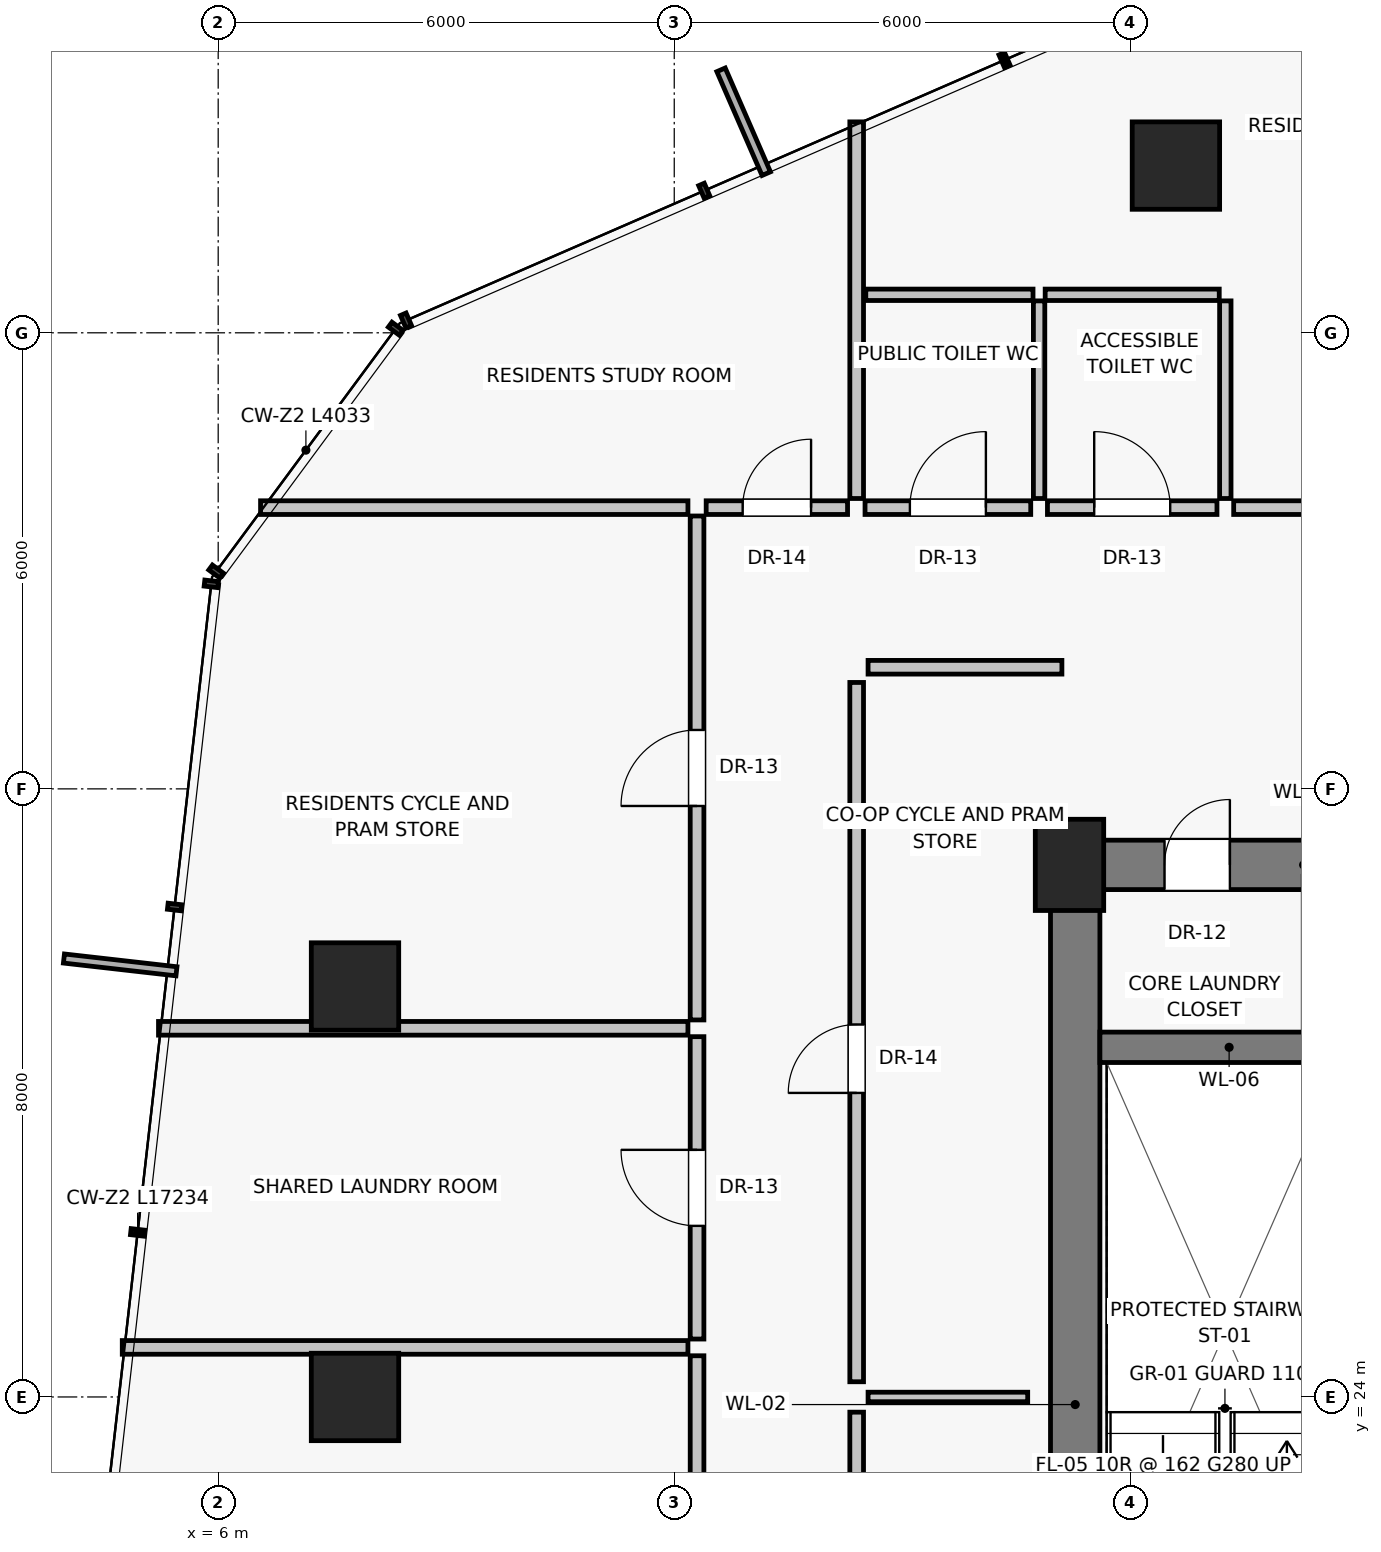
"""IFC4 building model, lengths in metres.
Left out: names, types, materials, properties, quantities, classifications, styles, units other than length and angle.
Written with IfcOpenShell. Run it as: python <this file> out.ifc"""

import sys

from ifc_helpers import new_model, si_unit, direction, frame, frame_2d, origin, origin_2d, place, context, subcontext, project, spatial, rectangle, extrude, source, transform, mapped, element, fill, save


model = new_model("IFC4")
c1 = context("Model", 3, precision=1e-05, world=origin(), true_north=direction((0.0, 1.0)))
c2 = subcontext(c1, "Body", "Model", "MODEL_VIEW")
j1 = project(units=[si_unit("LENGTHUNIT", "METRE"), si_unit("PLANEANGLEUNIT", "RADIAN")], contexts=[c1])
p1 = place(None, origin())
s1 = spatial("IfcSite", under=j1, at=p1, CompositionType="ELEMENT")
p2 = place(p1, origin())
s2 = spatial("IfcBuilding", under=s1, at=p2, CompositionType="ELEMENT")
p3 = place(p2, frame((0.0, 0.0, 105.7)))
s3 = spatial("IfcBuildingStorey", under=s2, at=p3, CompositionType="ELEMENT", Elevation=105.7)
p4 = place(p3, frame((17.2, 31.0, 0.0), z_axis=(0.0, 0.0, 1.0), x_axis=(1.0, 0.0, 0.0)))
e1 = element("IfcColumn", 1, at=p4, inside=s3, PredefinedType="PILASTER", context=c2, shape_type="SweptSolid", body=[
    extrude(rectangle(XDim=0.9, YDim=1.2, at=origin_2d()), origin(), (0.0, 0.0, 1.0), 3.25),
])
for number, where, z_axis, x_axis in (
    (2, (18.6, 40.2, 0.0), (0.0, 0.0, 1.0), (1.0, 0.0, 0.0)),
    (3, (7.8, 29.4, 0.0), (0.0, 0.0, 1.0), (1.0, 0.0, 0.0)),
    (4, (7.8, 24.0, 0.0), (0.0, 0.0, 1.0), (1.0, 0.0, 0.0)),
):
    element("IfcColumn", number, at=place(p3, frame(where, z_axis=z_axis, x_axis=x_axis)), inside=s3, PredefinedType="COLUMN", context=c2, shape_type="SweptSolid", body=[
        extrude(rectangle(XDim=1.15, YDim=1.15, at=origin_2d()), origin(), (0.0, 0.0, 1.0), 3.25),
    ])
p5 = place(p3, frame((17.275, 16.8, 0.0), z_axis=(0.0, 0.0, 1.0), x_axis=(0.0, 1.0, 0.0)))
e5 = element("IfcWall", 5, at=p5, inside=s3, PredefinedType="SHEAR", context=c2, shape_type="SweptSolid", body=[
    extrude(rectangle(XDim=14.2, YDim=0.65, at=frame_2d((7.1, 0.0))), origin(), (0.0, 0.0, 1.0), 2.97),
])
p6 = place(p3, frame((17.2, 31.0, 0.0), z_axis=(0.0, 0.0, 1.0), x_axis=(1.0, 0.0, 0.0)))
e6 = element("IfcWall", 6, at=p6, inside=s3, PredefinedType="SHEAR", context=c2, shape_type="SweptSolid", body=[
    extrude(rectangle(XDim=3.8, YDim=0.65, at=frame_2d((1.9, 0.0))), origin(), (0.0, 0.0, 1.0), 2.97),
])
p7 = place(p6, frame((1.25, 0.0, 0.0)))
e7 = element("IfcOpeningElement", 7, at=p7, cuts=e6, PredefinedType="OPENING", context=c2, shape_type="SweptSolid", body=[
    extrude(rectangle(XDim=0.86, YDim=2.01, at=frame_2d((0.43, 1.005))), frame((0.0, 0.335, 0.0), z_axis=(0.0, -1.0, 0.0), x_axis=(1.0, 0.0, 0.0)), (0.0, 0.0, 1.0), 0.67),
])
p8 = place(p3, frame((17.6, 28.6, 0.0), z_axis=(0.0, 0.0, 1.0), x_axis=(1.0, 0.0, 0.0)))
e8 = element("IfcWall", 8, at=p8, inside=s3, PredefinedType="SHEAR", context=c2, shape_type="SweptSolid", body=[
    extrude(rectangle(XDim=3.4, YDim=0.4, at=frame_2d((1.7, 0.0))), origin(), (0.0, 0.0, 1.0), 2.97),
])
p9 = place(p3, frame((14.4, 14.4, 0.0), z_axis=(0.0, 0.0, 1.0), x_axis=(0.0, 1.0, 0.0)))
e9 = element("IfcWall", 9, at=p9, inside=s3, PredefinedType="PARTITIONING", context=c2, shape_type="SweptSolid", body=[
    extrude(rectangle(XDim=9.4, YDim=0.18, at=frame_2d((4.7, 0.0))), origin(), (0.0, 0.0, 1.0), 2.97),
])
p10 = place(p9, frame((3.8, 0.0, 0.0)))
e10 = element("IfcOpeningElement", 10, at=p10, cuts=e9, PredefinedType="OPENING", context=c2, shape_type="SweptSolid", body=[
    extrude(rectangle(XDim=0.9, YDim=2.01, at=frame_2d((0.45, 1.005))), frame((0.0, 0.1, 0.0), z_axis=(0.0, -1.0, 0.0), x_axis=(1.0, 0.0, 0.0)), (0.0, 0.0, 1.0), 0.2),
])
p11 = place(p3, frame((14.4, 24.2, 0.0), z_axis=(0.0, 0.0, 1.0), x_axis=(0.0, 1.0, 0.0)))
e11 = element("IfcWall", 11, at=p11, inside=s3, PredefinedType="PARTITIONING", context=c2, shape_type="SweptSolid", body=[
    extrude(rectangle(XDim=9.2, YDim=0.18, at=frame_2d((4.6, 0.0))), origin(), (0.0, 0.0, 1.0), 2.97),
])
p12 = place(p11, frame((3.8, 0.0, 0.0)))
e12 = element("IfcOpeningElement", 12, at=p12, cuts=e11, PredefinedType="OPENING", context=c2, shape_type="SweptSolid", body=[
    extrude(rectangle(XDim=0.9, YDim=2.01, at=frame_2d((0.45, 1.005))), frame((0.0, 0.1, 0.0), z_axis=(0.0, -1.0, 0.0), x_axis=(1.0, 0.0, 0.0)), (0.0, 0.0, 1.0), 0.2),
])
p13 = place(p3, frame((14.55, 24.0, 0.0), z_axis=(0.0, 0.0, 1.0), x_axis=(1.0, 0.0, 0.0)))
e13 = element("IfcWall", 13, at=p13, inside=s3, PredefinedType="PARTITIONING", context=c2, shape_type="SweptSolid", body=[
    extrude(rectangle(XDim=2.1, YDim=0.125, at=frame_2d((1.05, 0.0))), origin(), (0.0, 0.0, 1.0), 2.97),
])
p14 = place(p3, frame((14.55, 33.6, 0.0), z_axis=(0.0, 0.0, 1.0), x_axis=(1.0, 0.0, 0.0)))
e14 = element("IfcWall", 14, at=p14, inside=s3, PredefinedType="PARTITIONING", context=c2, shape_type="SweptSolid", body=[
    extrude(rectangle(XDim=2.55, YDim=0.18, at=frame_2d((1.275, 0.0))), origin(), (0.0, 0.0, 1.0), 2.97),
])
p15 = place(p3, frame((14.4, 35.82, 0.0), z_axis=(0.0, 0.0, 1.0), x_axis=(0.0, 1.0, 0.0)))
e15 = element("IfcWall", 15, at=p15, inside=s3, PredefinedType="PARTITIONING", context=c2, shape_type="SweptSolid", body=[
    extrude(rectangle(XDim=4.955, YDim=0.18, at=frame_2d((2.478, 0.0))), origin(), (0.0, 0.0, 1.0), 2.97),
])
p16 = place(p3, frame((14.51, 35.7, 0.0), z_axis=(0.0, 0.0, 1.0), x_axis=(1.0, 0.0, 0.0)))
e16 = element("IfcWall", 16, at=p16, inside=s3, PredefinedType="PARTITIONING", context=c2, shape_type="SweptSolid", body=[
    extrude(rectangle(XDim=2.18, YDim=0.18, at=frame_2d((1.09, 0.0))), origin(), (0.0, 0.0, 1.0), 2.97),
])
p17 = place(p16, frame((0.59, 0.0, 0.0)))
e17 = element("IfcOpeningElement", 17, at=p17, cuts=e16, PredefinedType="OPENING", context=c2, shape_type="SweptSolid", body=[
    extrude(rectangle(XDim=1.0, YDim=2.01, at=frame_2d((0.5, 1.005))), frame((0.0, 0.1, 0.0), z_axis=(0.0, -1.0, 0.0), x_axis=(1.0, 0.0, 0.0)), (0.0, 0.0, 1.0), 0.2),
])
p18 = place(p3, frame((16.91, 35.7, 0.0), z_axis=(0.0, 0.0, 1.0), x_axis=(1.0, 0.0, 0.0)))
e18 = element("IfcWall", 18, at=p18, inside=s3, PredefinedType="PARTITIONING", context=c2, shape_type="SweptSolid", body=[
    extrude(rectangle(XDim=2.23, YDim=0.18, at=frame_2d((1.115, 0.0))), origin(), (0.0, 0.0, 1.0), 2.55),
])
p19 = place(p18, frame((0.615, 0.0, 0.0)))
e19 = element("IfcOpeningElement", 19, at=p19, cuts=e18, PredefinedType="OPENING", context=c2, shape_type="SweptSolid", body=[
    extrude(rectangle(XDim=1.0, YDim=2.01, at=frame_2d((0.5, 1.005))), frame((0.0, 0.1, 0.0), z_axis=(0.0, -1.0, 0.0), x_axis=(1.0, 0.0, 0.0)), (0.0, 0.0, 1.0), 0.2),
])
p20 = place(p3, frame((19.36, 35.7, 0.0), z_axis=(0.0, 0.0, 1.0), x_axis=(1.0, 0.0, 0.0)))
e20 = element("IfcWall", 20, at=p20, inside=s3, PredefinedType="PARTITIONING", context=c2, shape_type="SweptSolid", body=[
    extrude(rectangle(XDim=4.53, YDim=0.18, at=frame_2d((2.265, 0.0))), origin(), (0.0, 0.0, 1.0), 2.55),
])
p21 = place(p20, frame((1.765, 0.0, 0.0)))
e21 = element("IfcOpeningElement", 21, at=p21, cuts=e20, PredefinedType="OPENING", context=c2, shape_type="SweptSolid", body=[
    extrude(rectangle(XDim=1.0, YDim=2.01, at=frame_2d((0.5, 1.005))), frame((0.0, 0.1, 0.0), z_axis=(0.0, -1.0, 0.0), x_axis=(1.0, 0.0, 0.0)), (0.0, 0.0, 1.0), 0.2),
])
for number, where, z_axis, x_axis in (
    (22, (16.8, 35.82, 0.0), (0.0, 0.0, 1.0), (0.0, 1.0, 0.0)),
    (23, (19.25, 35.82, 0.0), (0.0, 0.0, 1.0), (0.0, 1.0, 0.0)),
):
    element("IfcWall", number, at=place(p3, frame(where, z_axis=z_axis, x_axis=x_axis)), inside=s3, PredefinedType="PARTITIONING", context=c2, shape_type="SweptSolid", body=[
        extrude(rectangle(XDim=2.6, YDim=0.15, at=frame_2d((1.3, 0.0))), origin(), (0.0, 0.0, 1.0), 2.97),
    ])
p22 = place(p3, frame((14.52, 38.5, 0.0), z_axis=(0.0, 0.0, 1.0), x_axis=(1.0, 0.0, 0.0)))
e24 = element("IfcWall", 24, at=p22, inside=s3, PredefinedType="PARTITIONING", context=c2, shape_type="SweptSolid", body=[
    extrude(rectangle(XDim=2.2, YDim=0.15, at=frame_2d((1.1, 0.0))), origin(), (0.0, 0.0, 1.0), 2.97),
])
p23 = place(p3, frame((16.88, 38.5, 0.0), z_axis=(0.0, 0.0, 1.0), x_axis=(1.0, 0.0, 0.0)))
e25 = element("IfcWall", 25, at=p23, inside=s3, PredefinedType="PARTITIONING", context=c2, shape_type="SweptSolid", body=[
    extrude(rectangle(XDim=2.29, YDim=0.15, at=frame_2d((1.145, 0.0))), origin(), (0.0, 0.0, 1.0), 2.97),
])
p24 = place(p3, frame((12.18, 35.7, 0.0), z_axis=(0.0, 0.0, 1.0), x_axis=(-1.0, 0.0, 0.0)))
e26 = element("IfcWall", 26, at=p24, inside=s3, PredefinedType="PARTITIONING", context=c2, shape_type="SweptSolid", body=[
    extrude(rectangle(XDim=5.622, YDim=0.18, at=frame_2d((2.811, 0.0))), origin(), (0.0, 0.0, 1.0), 2.97),
])
p25 = place(p3, frame((12.3, 16.98, 0.0), z_axis=(0.0, 0.0, 1.0), x_axis=(0.0, 1.0, 0.0)))
e27 = element("IfcWall", 27, at=p25, inside=s3, PredefinedType="PARTITIONING", context=c2, shape_type="SweptSolid", body=[
    extrude(rectangle(XDim=7.562, YDim=0.18, at=frame_2d((3.781, 0.0))), origin(), (0.0, 0.0, 1.0), 2.55),
])
p26 = place(p25, frame((3.281, 0.0, 0.0)))
e28 = element("IfcOpeningElement", 28, at=p26, cuts=e27, PredefinedType="OPENING", context=c2, shape_type="SweptSolid", body=[
    extrude(rectangle(XDim=1.0, YDim=2.01, at=frame_2d((0.5, 1.005))), frame((0.0, 0.1, 0.0), z_axis=(0.0, -1.0, 0.0), x_axis=(1.0, 0.0, 0.0)), (0.0, 0.0, 1.0), 0.2),
])
p27 = place(p3, frame((12.18, 24.652, 0.0), z_axis=(0.0, 0.0, 1.0), x_axis=(-1.0, 0.0, 0.0)))
e29 = element("IfcWall", 29, at=p27, inside=s3, PredefinedType="PARTITIONING", context=c2, shape_type="SweptSolid", body=[
    extrude(rectangle(XDim=7.442, YDim=0.18, at=frame_2d((3.721, 0.0))), origin(), (0.0, 0.0, 1.0), 2.97),
])
p28 = place(p3, frame((12.3, 24.762, 0.0), z_axis=(0.0, 0.0, 1.0), x_axis=(0.0, 1.0, 0.0)))
e30 = element("IfcWall", 30, at=p28, inside=s3, PredefinedType="PARTITIONING", context=c2, shape_type="SweptSolid", body=[
    extrude(rectangle(XDim=3.978, YDim=0.18, at=frame_2d((1.989, 0.0))), origin(), (0.0, 0.0, 1.0), 2.55),
])
p29 = place(p28, frame((1.489, 0.0, 0.0)))
e31 = element("IfcOpeningElement", 31, at=p29, cuts=e30, PredefinedType="OPENING", context=c2, shape_type="SweptSolid", body=[
    extrude(rectangle(XDim=1.0, YDim=2.01, at=frame_2d((0.5, 1.005))), frame((0.0, 0.1, 0.0), z_axis=(0.0, -1.0, 0.0), x_axis=(1.0, 0.0, 0.0)), (0.0, 0.0, 1.0), 0.2),
])
p30 = place(p3, frame((12.3, 28.96, 0.0), z_axis=(0.0, 0.0, 1.0), x_axis=(0.0, 1.0, 0.0)))
e32 = element("IfcWall", 32, at=p30, inside=s3, PredefinedType="PARTITIONING", context=c2, shape_type="SweptSolid", body=[
    extrude(rectangle(XDim=6.63, YDim=0.18, at=frame_2d((3.315, 0.0))), origin(), (0.0, 0.0, 1.0), 2.55),
])
p31 = place(p30, frame((2.815, 0.0, 0.0)))
e33 = element("IfcOpeningElement", 33, at=p31, cuts=e32, PredefinedType="OPENING", context=c2, shape_type="SweptSolid", body=[
    extrude(rectangle(XDim=1.0, YDim=2.01, at=frame_2d((0.5, 1.005))), frame((0.0, 0.1, 0.0), z_axis=(0.0, -1.0, 0.0), x_axis=(1.0, 0.0, 0.0)), (0.0, 0.0, 1.0), 0.2),
])
p32 = place(p3, frame((12.18, 28.85, 0.0), z_axis=(0.0, 0.0, 1.0), x_axis=(-1.0, 0.0, 0.0)))
e34 = element("IfcWall", 34, at=p32, inside=s3, PredefinedType="PARTITIONING", context=c2, shape_type="SweptSolid", body=[
    extrude(rectangle(XDim=6.965, YDim=0.18, at=frame_2d((3.482, 0.0))), origin(), (0.0, 0.0, 1.0), 2.348),
])
p33 = place(p3, frame((12.42, 35.7, 0.0), z_axis=(0.0, 0.0, 1.0), x_axis=(1.0, 0.0, 0.0)))
e35 = element("IfcWall", 35, at=p33, inside=s3, PredefinedType="PARTITIONING", context=c2, shape_type="SweptSolid", body=[
    extrude(rectangle(XDim=1.86, YDim=0.18, at=frame_2d((0.93, 0.0))), origin(), (0.0, 0.0, 1.0), 2.97),
])
p34 = place(p33, frame((0.48, 0.0, 0.0)))
e36 = element("IfcOpeningElement", 36, at=p34, cuts=e35, PredefinedType="OPENING", context=c2, shape_type="SweptSolid", body=[
    extrude(rectangle(XDim=0.9, YDim=2.01, at=frame_2d((0.45, 1.005))), frame((0.0, 0.1, 0.0), z_axis=(0.0, -1.0, 0.0), x_axis=(1.0, 0.0, 0.0)), (0.0, 0.0, 1.0), 0.2),
])
m1 = source(origin(), c2, "Body", "SweptSolid", [
    extrude(rectangle(XDim=0.86, YDim=2.01, at=frame_2d((0.43, 1.005))), frame((0.0, 0.025, 0.0), z_axis=(0.0, -1.0, 0.0), x_axis=(1.0, 0.0, 0.0)), (0.0, 0.0, 1.0), 0.05),
])
p35 = place(p7, origin())
e37 = element("IfcDoor", 37, at=p35, inside=s3, OperationType="SINGLE_SWING_RIGHT", PredefinedType="DOOR", context=c2, shape_type="MappedRepresentation", body=[
    mapped(m1, transform((0.0, 0.0, 0.0), scale=1.0)),
])
fill(e7, e37)
m2 = source(origin(), c2, "Body", "SweptSolid", [
    extrude(rectangle(XDim=0.9, YDim=2.01, at=frame_2d((0.45, 1.005))), frame((0.0, 0.025, 0.0), z_axis=(0.0, -1.0, 0.0), x_axis=(1.0, 0.0, 0.0)), (0.0, 0.0, 1.0), 0.05),
])
p36 = place(p12, origin())
e38 = element("IfcDoor", 38, at=p36, inside=s3, OperationType="SINGLE_SWING_LEFT", PredefinedType="DOOR", context=c2, shape_type="MappedRepresentation", body=[
    mapped(m2, transform((0.0, 0.0, 0.0), scale=1.0)),
])
fill(e12, e38)
m3 = source(origin(), c2, "Body", "SweptSolid", [
    extrude(rectangle(XDim=1.0, YDim=2.01, at=frame_2d((0.5, 1.005))), frame((0.0, 0.025, 0.0), z_axis=(0.0, -1.0, 0.0), x_axis=(1.0, 0.0, 0.0)), (0.0, 0.0, 1.0), 0.05),
])
p37 = place(p17, origin())
e39 = element("IfcDoor", 39, at=p37, inside=s3, OperationType="SINGLE_SWING_RIGHT", PredefinedType="DOOR", context=c2, shape_type="MappedRepresentation", body=[
    mapped(m3, transform((0.0, 0.0, 0.0), scale=1.0)),
])
fill(e17, e39)
p38 = place(p19, origin())
e40 = element("IfcDoor", 40, at=p38, inside=s3, OperationType="SINGLE_SWING_LEFT", PredefinedType="DOOR", context=c2, shape_type="MappedRepresentation", body=[
    mapped(m3, transform((0.0, 0.0, 0.0), scale=1.0)),
])
fill(e19, e40)
p39 = place(p29, origin())
e41 = element("IfcDoor", 41, at=p39, inside=s3, OperationType="SINGLE_SWING_RIGHT", PredefinedType="DOOR", context=c2, shape_type="MappedRepresentation", body=[
    mapped(m3, transform((0.0, 0.0, 0.0), scale=1.0)),
])
fill(e31, e41)
p40 = place(p31, origin())
e42 = element("IfcDoor", 42, at=p40, inside=s3, OperationType="SINGLE_SWING_LEFT", PredefinedType="DOOR", context=c2, shape_type="MappedRepresentation", body=[
    mapped(m3, transform((0.0, 0.0, 0.0), scale=1.0)),
])
fill(e33, e42)
p41 = place(p34, origin())
e43 = element("IfcDoor", 43, at=p41, inside=s3, OperationType="SINGLE_SWING_RIGHT", PredefinedType="DOOR", context=c2, shape_type="MappedRepresentation", body=[
    mapped(m2, transform((0.0, 0.0, 0.0), scale=1.0)),
])
fill(e36, e43)
save(model, sys.argv[1])
